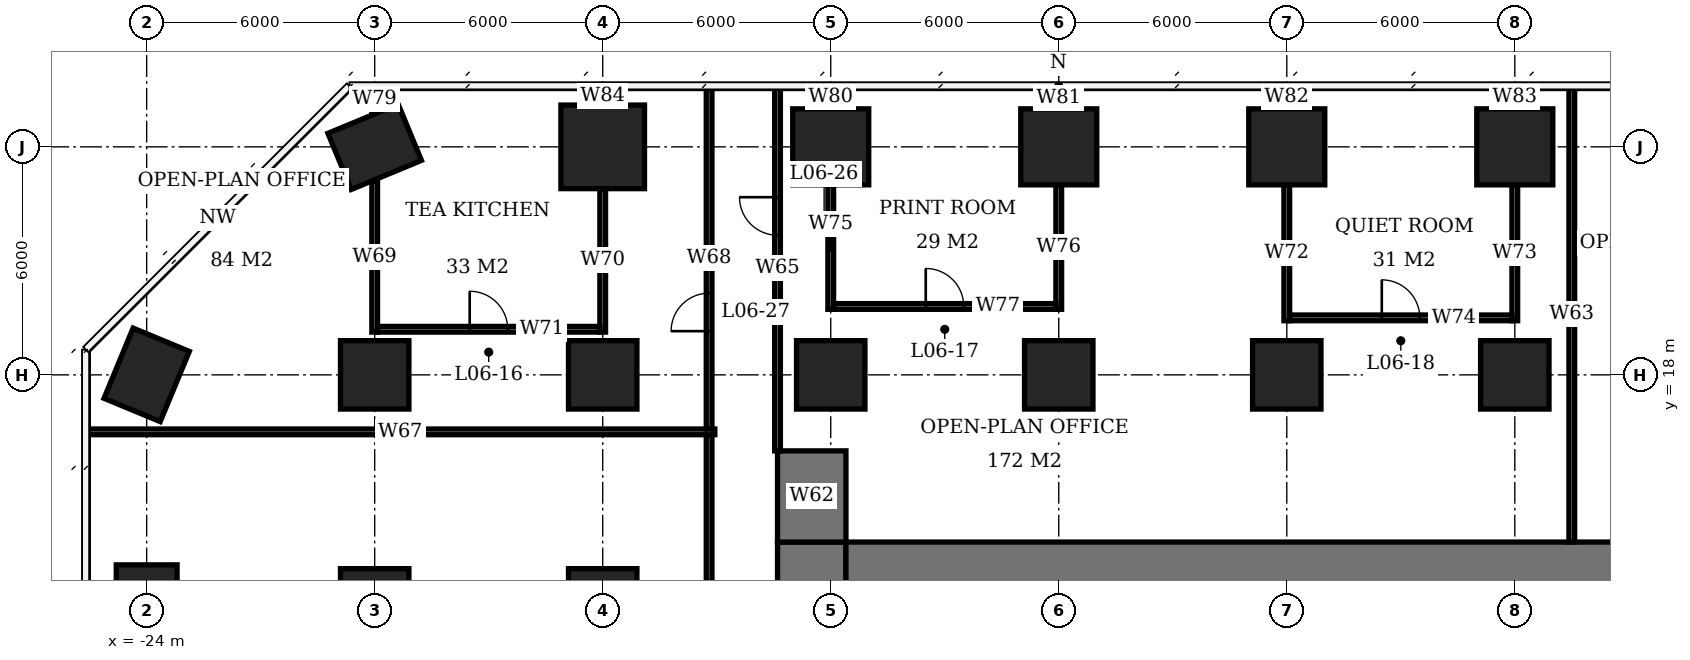
"""IFC4 building model, lengths in metres.
Left out: names, types, materials, properties, quantities, classifications, styles, units other than length and angle.
Written with IfcOpenShell. Run it as: python <this file> out.ifc"""

import sys

from ifc_helpers import new_model, si_unit, direction, frame, frame_2d, origin, origin_2d, place, context, subcontext, project, spatial, rectangle, extrude, element, fill, save


model = new_model("IFC4")
c1 = context("Model", 3, precision=1e-05, world=origin(), true_north=direction((0.0, 1.0)))
c2 = subcontext(c1, "Body", "Model", "MODEL_VIEW")
j1 = project(units=[si_unit("LENGTHUNIT", "METRE"), si_unit("PLANEANGLEUNIT", "RADIAN")], contexts=[c1])
p1 = place(None, origin())
s1 = spatial("IfcSite", under=j1, at=p1, CompositionType="ELEMENT")
p2 = place(p1, origin())
s2 = spatial("IfcBuilding", under=s1, at=p2, CompositionType="ELEMENT")
p3 = place(p2, frame((0.0, 0.0, 29.9)))
s3 = spatial("IfcBuildingStorey", under=s2, at=p3, CompositionType="ELEMENT", Elevation=29.9)
for number, where, z_axis, x_axis in (
    (1, (-24.0, 12.0, 0.0), (0.0, 0.0, 1.0), (0.0, 1.0, 0.0)),
    (2, (-24.0, 18.0, 0.0), (0.0, 0.0, 1.0), (0.383, 0.924, 0.0)),
):
    element("IfcColumn", number, at=place(p3, frame(where, z_axis=z_axis, x_axis=x_axis)), inside=s3, PredefinedType="COLUMN", context=c2, shape_type="SweptSolid", body=[
        extrude(rectangle(XDim=2.0, YDim=1.6, at=origin_2d()), origin(), (0.0, 0.0, 1.0), 3.9),
    ])
for number, where, z_axis, x_axis in (
    (3, (-18.0, 12.0, 0.0), (0.0, 0.0, 1.0), (1.0, 0.0, 0.0)),
    (4, (-18.0, 18.0, 0.0), (0.0, 0.0, 1.0), (1.0, 0.0, 0.0)),
):
    element("IfcColumn", number, at=place(p3, frame(where, z_axis=z_axis, x_axis=x_axis)), inside=s3, PredefinedType="COLUMN", context=c2, shape_type="SweptSolid", body=[
        extrude(rectangle(XDim=1.8, YDim=1.8, at=origin_2d()), origin(), (0.0, 0.0, 1.0), 3.9),
    ])
p4 = place(p3, frame((-18.0, 24.0, 0.0), z_axis=(0.0, 0.0, 1.0), x_axis=(0.923879532511, 0.382683432365, 0.0)))
e5 = element("IfcColumn", 5, at=p4, inside=s3, PredefinedType="COLUMN", context=c2, shape_type="SweptSolid", body=[
    extrude(rectangle(XDim=2.0, YDim=1.6, at=origin_2d()), origin(), (0.0, 0.0, 1.0), 3.9),
])
for number, where, z_axis, x_axis in (
    (6, (-12.0, 12.0, 0.0), (0.0, 0.0, 1.0), (1.0, 0.0, 0.0)),
    (7, (-12.0, 18.0, 0.0), (0.0, 0.0, 1.0), (1.0, 0.0, 0.0)),
):
    element("IfcColumn", number, at=place(p3, frame(where, z_axis=z_axis, x_axis=x_axis)), inside=s3, PredefinedType="COLUMN", context=c2, shape_type="SweptSolid", body=[
        extrude(rectangle(XDim=1.8, YDim=1.8, at=origin_2d()), origin(), (0.0, 0.0, 1.0), 3.9),
    ])
p5 = place(p3, frame((-12.0, 24.0, 0.0), z_axis=(0.0, 0.0, 1.0), x_axis=(1.0, 0.0, 0.0)))
e8 = element("IfcColumn", 8, at=p5, inside=s3, PredefinedType="COLUMN", context=c2, shape_type="SweptSolid", body=[
    extrude(rectangle(XDim=2.2, YDim=2.2, at=origin_2d()), origin(), (0.0, 0.0, 1.0), 3.9),
])
p6 = place(p3, frame((-6.0, 18.0, 0.0), z_axis=(0.0, 0.0, 1.0), x_axis=(1.0, 0.0, 0.0)))
e9 = element("IfcColumn", 9, at=p6, inside=s3, PredefinedType="COLUMN", context=c2, shape_type="SweptSolid", body=[
    extrude(rectangle(XDim=1.8, YDim=1.8, at=origin_2d()), origin(), (0.0, 0.0, 1.0), 3.9),
])
p7 = place(p3, frame((-6.0, 24.0, 0.0), z_axis=(0.0, 0.0, 1.0), x_axis=(1.0, 0.0, 0.0)))
e10 = element("IfcColumn", 10, at=p7, inside=s3, PredefinedType="COLUMN", context=c2, shape_type="SweptSolid", body=[
    extrude(rectangle(XDim=2.0, YDim=2.0, at=origin_2d()), origin(), (0.0, 0.0, 1.0), 3.9),
])
p8 = place(p3, frame((0.0, 18.0, 0.0), z_axis=(0.0, 0.0, 1.0), x_axis=(1.0, 0.0, 0.0)))
e11 = element("IfcColumn", 11, at=p8, inside=s3, PredefinedType="COLUMN", context=c2, shape_type="SweptSolid", body=[
    extrude(rectangle(XDim=1.8, YDim=1.8, at=origin_2d()), origin(), (0.0, 0.0, 1.0), 3.9),
])
p9 = place(p3, frame((0.0, 24.0, 0.0), z_axis=(0.0, 0.0, 1.0), x_axis=(1.0, 0.0, 0.0)))
e12 = element("IfcColumn", 12, at=p9, inside=s3, PredefinedType="COLUMN", context=c2, shape_type="SweptSolid", body=[
    extrude(rectangle(XDim=2.0, YDim=2.0, at=origin_2d()), origin(), (0.0, 0.0, 1.0), 3.9),
])
p10 = place(p3, frame((6.0, 18.0, 0.0), z_axis=(0.0, 0.0, 1.0), x_axis=(1.0, 0.0, 0.0)))
e13 = element("IfcColumn", 13, at=p10, inside=s3, PredefinedType="COLUMN", context=c2, shape_type="SweptSolid", body=[
    extrude(rectangle(XDim=1.8, YDim=1.8, at=origin_2d()), origin(), (0.0, 0.0, 1.0), 3.9),
])
p11 = place(p3, frame((6.0, 24.0, 0.0), z_axis=(0.0, 0.0, 1.0), x_axis=(1.0, 0.0, 0.0)))
e14 = element("IfcColumn", 14, at=p11, inside=s3, PredefinedType="COLUMN", context=c2, shape_type="SweptSolid", body=[
    extrude(rectangle(XDim=2.0, YDim=2.0, at=origin_2d()), origin(), (0.0, 0.0, 1.0), 3.9),
])
p12 = place(p3, frame((12.0, 18.0, 0.0), z_axis=(0.0, 0.0, 1.0), x_axis=(1.0, 0.0, 0.0)))
e15 = element("IfcColumn", 15, at=p12, inside=s3, PredefinedType="COLUMN", context=c2, shape_type="SweptSolid", body=[
    extrude(rectangle(XDim=1.8, YDim=1.8, at=origin_2d()), origin(), (0.0, 0.0, 1.0), 3.9),
])
p13 = place(p3, frame((12.0, 24.0, 0.0), z_axis=(0.0, 0.0, 1.0), x_axis=(1.0, 0.0, 0.0)))
e16 = element("IfcColumn", 16, at=p13, inside=s3, PredefinedType="COLUMN", context=c2, shape_type="SweptSolid", body=[
    extrude(rectangle(XDim=2.0, YDim=2.0, at=origin_2d()), origin(), (0.0, 0.0, 1.0), 3.9),
])
p14 = place(p3, frame((-5.6, 12.6, 0.0), z_axis=(0.0, 0.0, 1.0), x_axis=(1.0, 0.0, 0.0)))
e17 = element("IfcWall", 17, at=p14, inside=s3, PredefinedType="SHEAR", context=c2, shape_type="SweptSolid", body=[
    extrude(rectangle(XDim=23.2, YDim=2.0, at=frame_2d((11.6, 0.0))), origin(), (0.0, 0.0, 1.0), 3.9),
])
p15 = place(p3, frame((-6.5, -7.6, 0.0), z_axis=(0.0, 0.0, 1.0), x_axis=(0.0, 1.0, 0.0)))
e18 = element("IfcWall", 18, at=p15, inside=s3, PredefinedType="SHEAR", context=c2, shape_type="SweptSolid", body=[
    extrude(rectangle(XDim=21.2, YDim=1.8, at=frame_2d((10.6, 0.0))), origin(), (0.0, 0.0, 1.0), 3.9),
])
p16 = place(p15, frame((7.8, 0.0, 0.0)))
e19 = element("IfcOpeningElement", 19, at=p16, cuts=e18, PredefinedType="OPENING", context=c2, shape_type="SweptSolid", body=[
    extrude(rectangle(XDim=1.8, YDim=2.4, at=frame_2d((0.9, 1.2))), frame((0.0, 0.91, 0.0), z_axis=(0.0, -1.0, 0.0), x_axis=(1.0, 0.0, 0.0)), (0.0, 0.0, 1.0), 1.82),
])
p17 = place(p3, frame((-6.5, 13.6, 0.0), z_axis=(0.0, 0.0, 1.0), x_axis=(0.0, 1.0, 0.0)))
e20 = element("IfcWall", 20, at=p17, inside=s3, PredefinedType="SHEAR", context=c2, shape_type="SweptSolid", body=[
    extrude(rectangle(XDim=2.4, YDim=1.8, at=frame_2d((1.2, 0.0))), origin(), (0.0, 0.0, 1.0), 3.9),
])
p18 = place(p3, frame((-17.925, 19.2, 0.0), z_axis=(0.0, 0.0, 1.0), x_axis=(1.0, 0.0, 0.0)))
e21 = element("IfcWall", 21, at=p18, inside=s3, PredefinedType="PARTITIONING", context=c2, shape_type="SweptSolid", body=[
    extrude(rectangle(XDim=5.85, YDim=0.15, at=frame_2d((2.925, 0.0))), origin(), (0.0, 0.0, 1.0), 3.65),
])
p19 = place(p18, frame((2.425, 0.0, 0.0)))
e22 = element("IfcOpeningElement", 22, at=p19, cuts=e21, PredefinedType="OPENING", context=c2, shape_type="SweptSolid", body=[
    extrude(rectangle(XDim=1.0, YDim=2.1, at=frame_2d((0.5, 1.05))), frame((0.0, 0.085, 0.0), z_axis=(0.0, -1.0, 0.0), x_axis=(1.0, 0.0, 0.0)), (0.0, 0.0, 1.0), 0.17),
])
p20 = place(p3, frame((6.075, 19.5, 0.0), z_axis=(0.0, 0.0, 1.0), x_axis=(1.0, 0.0, 0.0)))
e23 = element("IfcWall", 23, at=p20, inside=s3, PredefinedType="PARTITIONING", context=c2, shape_type="SweptSolid", body=[
    extrude(rectangle(XDim=5.85, YDim=0.15, at=frame_2d((2.925, 0.0))), origin(), (0.0, 0.0, 1.0), 3.65),
])
p21 = place(p20, frame((2.425, 0.0, 0.0)))
e24 = element("IfcOpeningElement", 24, at=p21, cuts=e23, PredefinedType="OPENING", context=c2, shape_type="SweptSolid", body=[
    extrude(rectangle(XDim=1.0, YDim=2.1, at=frame_2d((0.5, 1.05))), frame((0.0, 0.085, 0.0), z_axis=(0.0, -1.0, 0.0), x_axis=(1.0, 0.0, 0.0)), (0.0, 0.0, 1.0), 0.17),
])
p22 = place(p3, frame((-5.925, 19.8, 0.0), z_axis=(0.0, 0.0, 1.0), x_axis=(1.0, 0.0, 0.0)))
e25 = element("IfcWall", 25, at=p22, inside=s3, PredefinedType="PARTITIONING", context=c2, shape_type="SweptSolid", body=[
    extrude(rectangle(XDim=5.85, YDim=0.15, at=frame_2d((2.925, 0.0))), origin(), (0.0, 0.0, 1.0), 3.65),
])
p23 = place(p22, frame((2.425, 0.0, 0.0)))
e26 = element("IfcOpeningElement", 26, at=p23, cuts=e25, PredefinedType="OPENING", context=c2, shape_type="SweptSolid", body=[
    extrude(rectangle(XDim=1.0, YDim=2.1, at=frame_2d((0.5, 1.05))), frame((0.0, 0.085, 0.0), z_axis=(0.0, -1.0, 0.0), x_axis=(1.0, 0.0, 0.0)), (0.0, 0.0, 1.0), 0.17),
])
p24 = place(p3, frame((-18.0, 19.125, 0.0), z_axis=(0.0, 0.0, 1.0), x_axis=(0.0, 1.0, 0.0)))
e27 = element("IfcWall", 27, at=p24, inside=s3, PredefinedType="PARTITIONING", context=c2, shape_type="SweptSolid", body=[
    extrude(rectangle(XDim=3.978, YDim=0.15, at=frame_2d((1.989, 0.0))), origin(), (0.0, 0.0, 1.0), 3.65),
])
p25 = place(p3, frame((-18.0, 24.897, 0.0), z_axis=(0.0, 0.0, 1.0), x_axis=(0.0, 1.0, 0.0)))
e28 = element("IfcWall", 28, at=p25, inside=s3, PredefinedType="PARTITIONING", context=c2, shape_type="SweptSolid", body=[
    extrude(rectangle(XDim=0.703, YDim=0.15, at=frame_2d((0.352, 0.0))), origin(), (0.0, 0.0, 1.0), 3.65),
])
p26 = place(p3, frame((-12.0, 19.125, 0.0), z_axis=(0.0, 0.0, 1.0), x_axis=(0.0, 1.0, 0.0)))
e29 = element("IfcWall", 29, at=p26, inside=s3, PredefinedType="PARTITIONING", context=c2, shape_type="SweptSolid", body=[
    extrude(rectangle(XDim=3.775, YDim=0.15, at=frame_2d((1.887, 0.0))), origin(), (0.0, 0.0, 1.0), 3.65),
])
p27 = place(p3, frame((-12.0, 25.1, 0.0), z_axis=(0.0, 0.0, 1.0), x_axis=(0.0, 1.0, 0.0)))
e30 = element("IfcWall", 30, at=p27, inside=s3, PredefinedType="PARTITIONING", context=c2, shape_type="SweptSolid", body=[
    extrude(rectangle(XDim=0.5, YDim=0.15, at=frame_2d((0.25, 0.0))), origin(), (0.0, 0.0, 1.0), 3.65),
])
p28 = place(p3, frame((-6.0, 19.725, 0.0), z_axis=(0.0, 0.0, 1.0), x_axis=(0.0, 1.0, 0.0)))
e31 = element("IfcWall", 31, at=p28, inside=s3, PredefinedType="PARTITIONING", context=c2, shape_type="SweptSolid", body=[
    extrude(rectangle(XDim=3.275, YDim=0.15, at=frame_2d((1.637, 0.0))), origin(), (0.0, 0.0, 1.0), 3.65),
])
p29 = place(p3, frame((-6.0, 25.0, 0.0), z_axis=(0.0, 0.0, 1.0), x_axis=(0.0, 1.0, 0.0)))
e32 = element("IfcWall", 32, at=p29, inside=s3, PredefinedType="PARTITIONING", context=c2, shape_type="SweptSolid", body=[
    extrude(rectangle(XDim=0.6, YDim=0.15, at=frame_2d((0.3, 0.0))), origin(), (0.0, 0.0, 1.0), 3.65),
])
p30 = place(p3, frame((0.0, 19.725, 0.0), z_axis=(0.0, 0.0, 1.0), x_axis=(0.0, 1.0, 0.0)))
e33 = element("IfcWall", 33, at=p30, inside=s3, PredefinedType="PARTITIONING", context=c2, shape_type="SweptSolid", body=[
    extrude(rectangle(XDim=3.275, YDim=0.15, at=frame_2d((1.637, 0.0))), origin(), (0.0, 0.0, 1.0), 3.65),
])
p31 = place(p3, frame((0.0, 25.0, 0.0), z_axis=(0.0, 0.0, 1.0), x_axis=(0.0, 1.0, 0.0)))
e34 = element("IfcWall", 34, at=p31, inside=s3, PredefinedType="PARTITIONING", context=c2, shape_type="SweptSolid", body=[
    extrude(rectangle(XDim=0.55, YDim=0.15, at=frame_2d((0.275, 0.0))), origin(), (0.0, 0.0, 1.0), 3.65),
])
p32 = place(p3, frame((6.0, 19.425, 0.0), z_axis=(0.0, 0.0, 1.0), x_axis=(0.0, 1.0, 0.0)))
e35 = element("IfcWall", 35, at=p32, inside=s3, PredefinedType="PARTITIONING", context=c2, shape_type="SweptSolid", body=[
    extrude(rectangle(XDim=3.575, YDim=0.15, at=frame_2d((1.788, 0.0))), origin(), (0.0, 0.0, 1.0), 3.65),
])
p33 = place(p3, frame((6.0, 25.0, 0.0), z_axis=(0.0, 0.0, 1.0), x_axis=(0.0, 1.0, 0.0)))
e36 = element("IfcWall", 36, at=p33, inside=s3, PredefinedType="PARTITIONING", context=c2, shape_type="SweptSolid", body=[
    extrude(rectangle(XDim=0.6, YDim=0.15, at=frame_2d((0.3, 0.0))), origin(), (0.0, 0.0, 1.0), 3.65),
])
p34 = place(p3, frame((12.0, 19.425, 0.0), z_axis=(0.0, 0.0, 1.0), x_axis=(0.0, 1.0, 0.0)))
e37 = element("IfcWall", 37, at=p34, inside=s3, PredefinedType="PARTITIONING", context=c2, shape_type="SweptSolid", body=[
    extrude(rectangle(XDim=3.575, YDim=0.15, at=frame_2d((1.788, 0.0))), origin(), (0.0, 0.0, 1.0), 3.65),
])
p35 = place(p3, frame((12.0, 25.0, 0.0), z_axis=(0.0, 0.0, 1.0), x_axis=(0.0, 1.0, 0.0)))
e38 = element("IfcWall", 38, at=p35, inside=s3, PredefinedType="PARTITIONING", context=c2, shape_type="SweptSolid", body=[
    extrude(rectangle(XDim=0.6, YDim=0.15, at=frame_2d((0.3, 0.0))), origin(), (0.0, 0.0, 1.0), 3.65),
])
p36 = place(p3, frame((-25.6, 16.5, 0.0), z_axis=(0.0, 0.0, 1.0), x_axis=(1.0, 0.0, 0.0)))
e39 = element("IfcWall", 39, at=p36, inside=s3, PredefinedType="PARTITIONING", context=c2, shape_type="SweptSolid", body=[
    extrude(rectangle(XDim=16.55, YDim=0.15, at=frame_2d((8.275, 0.0))), origin(), (0.0, 0.0, 1.0), 3.65),
])
p37 = place(p3, frame((-9.2, -1.425, 0.0), z_axis=(0.0, 0.0, 1.0), x_axis=(0.0, 1.0, 0.0)))
e40 = element("IfcWall", 40, at=p37, inside=s3, PredefinedType="PARTITIONING", context=c2, shape_type="SweptSolid", body=[
    extrude(rectangle(XDim=17.85, YDim=0.15, at=frame_2d((8.925, 0.0))), origin(), (0.0, 0.0, 1.0), 3.65),
])
p38 = place(p37, frame((5.725, 0.0, 0.0)))
e41 = element("IfcOpeningElement", 41, at=p38, cuts=e40, PredefinedType="OPENING", context=c2, shape_type="SweptSolid", body=[
    extrude(rectangle(XDim=1.0, YDim=2.1, at=frame_2d((0.5, 1.05))), frame((0.0, 0.085, 0.0), z_axis=(0.0, -1.0, 0.0), x_axis=(1.0, 0.0, 0.0)), (0.0, 0.0, 1.0), 0.17),
])
p39 = place(p3, frame((-9.2, 16.575, 0.0), z_axis=(0.0, 0.0, 1.0), x_axis=(0.0, 1.0, 0.0)))
e42 = element("IfcWall", 42, at=p39, inside=s3, PredefinedType="PARTITIONING", context=c2, shape_type="SweptSolid", body=[
    extrude(rectangle(XDim=8.975, YDim=0.15, at=frame_2d((4.488, 0.0))), origin(), (0.0, 0.0, 1.0), 3.65),
])
p40 = place(p39, frame((2.575, 0.0, 0.0)))
e43 = element("IfcOpeningElement", 43, at=p40, cuts=e42, PredefinedType="OPENING", context=c2, shape_type="SweptSolid", body=[
    extrude(rectangle(XDim=1.0, YDim=2.1, at=frame_2d((0.5, 1.05))), frame((0.0, 0.085, 0.0), z_axis=(0.0, -1.0, 0.0), x_axis=(1.0, 0.0, 0.0)), (0.0, 0.0, 1.0), 0.17),
])
p41 = place(p3, frame((-7.4, 16.0, 0.0), z_axis=(0.0, 0.0, 1.0), x_axis=(0.0, 1.0, 0.0)))
e44 = element("IfcWall", 44, at=p41, inside=s3, PredefinedType="PARTITIONING", context=c2, shape_type="SweptSolid", body=[
    extrude(rectangle(XDim=9.6, YDim=0.15, at=frame_2d((4.8, 0.0))), origin(), (0.0, 0.0, 1.0), 3.65),
])
p42 = place(p41, frame((5.675, 0.0, 0.0)))
e45 = element("IfcOpeningElement", 45, at=p42, cuts=e44, PredefinedType="OPENING", context=c2, shape_type="SweptSolid", body=[
    extrude(rectangle(XDim=1.0, YDim=2.1, at=frame_2d((0.5, 1.05))), frame((0.0, 0.085, 0.0), z_axis=(0.0, -1.0, 0.0), x_axis=(1.0, 0.0, 0.0)), (0.0, 0.0, 1.0), 0.17),
])
p43 = place(p3, frame((13.5, 13.6, 0.0), z_axis=(0.0, 0.0, 1.0), x_axis=(0.0, 1.0, 0.0)))
e46 = element("IfcWall", 46, at=p43, inside=s3, PredefinedType="PARTITIONING", context=c2, shape_type="SweptSolid", body=[
    extrude(rectangle(XDim=12.0, YDim=0.15, at=frame_2d((6.0, 0.0))), origin(), (0.0, 0.0, 1.0), 3.65),
])
p44 = place(p19, origin())
e47 = element("IfcDoor", 47, at=p44, inside=s3, OperationType="SINGLE_SWING_LEFT", PredefinedType="DOOR", context=c2, shape_type="SweptSolid", body=[
    extrude(rectangle(XDim=1.0, YDim=2.1, at=frame_2d((0.5, 1.05))), frame((0.0, 0.025, 0.0), z_axis=(0.0, -1.0, 0.0), x_axis=(1.0, 0.0, 0.0)), (0.0, 0.0, 1.0), 0.05),
])
fill(e22, e47)
p45 = place(p23, origin())
e48 = element("IfcDoor", 48, at=p45, inside=s3, OperationType="SINGLE_SWING_LEFT", PredefinedType="DOOR", context=c2, shape_type="SweptSolid", body=[
    extrude(rectangle(XDim=1.0, YDim=2.1, at=frame_2d((0.5, 1.05))), frame((0.0, 0.025, 0.0), z_axis=(0.0, -1.0, 0.0), x_axis=(1.0, 0.0, 0.0)), (0.0, 0.0, 1.0), 0.05),
])
fill(e26, e48)
p46 = place(p21, origin())
e49 = element("IfcDoor", 49, at=p46, inside=s3, OperationType="SINGLE_SWING_LEFT", PredefinedType="DOOR", context=c2, shape_type="SweptSolid", body=[
    extrude(rectangle(XDim=1.0, YDim=2.1, at=frame_2d((0.5, 1.05))), frame((0.0, 0.025, 0.0), z_axis=(0.0, -1.0, 0.0), x_axis=(1.0, 0.0, 0.0)), (0.0, 0.0, 1.0), 0.05),
])
fill(e24, e49)
p47 = place(p42, origin())
e50 = element("IfcDoor", 50, at=p47, inside=s3, OperationType="SINGLE_SWING_RIGHT", PredefinedType="DOOR", context=c2, shape_type="SweptSolid", body=[
    extrude(rectangle(XDim=1.0, YDim=2.1, at=frame_2d((0.5, 1.05))), frame((0.0, 0.025, 0.0), z_axis=(0.0, -1.0, 0.0), x_axis=(1.0, 0.0, 0.0)), (0.0, 0.0, 1.0), 0.05),
])
fill(e45, e50)
p48 = place(p40, origin())
e51 = element("IfcDoor", 51, at=p48, inside=s3, OperationType="SINGLE_SWING_LEFT", PredefinedType="DOOR", context=c2, shape_type="SweptSolid", body=[
    extrude(rectangle(XDim=1.0, YDim=2.1, at=frame_2d((0.5, 1.05))), frame((0.0, 0.025, 0.0), z_axis=(0.0, -1.0, 0.0), x_axis=(1.0, 0.0, 0.0)), (0.0, 0.0, 1.0), 0.05),
])
fill(e43, e51)
save(model, sys.argv[1])
